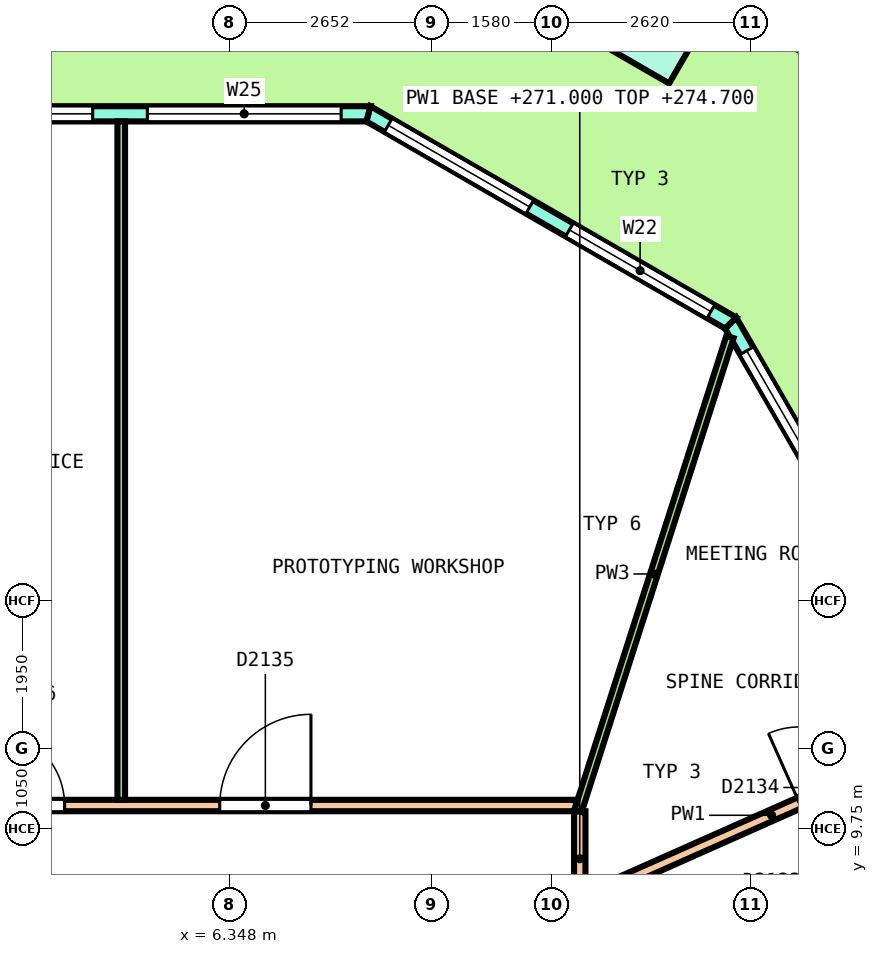
"""IFC4 building model, lengths in metres.
Left out: names, types, materials, properties, quantities, classifications, styles, units other than length and angle.
Written with IfcOpenShell. Run it as: python <this file> out.ifc"""

import sys

from ifc_helpers import new_model, si_unit, direction, frame, frame_2d, origin, origin_2d, place, context, subcontext, project, spatial, polyline, rectangle, outline, extrude, element, fill, save


model = new_model("IFC4")
c1 = context("Model", 3, precision=1e-05, world=origin(), true_north=direction((0.0, 1.0)))
c2 = subcontext(c1, "Body", "Model", "MODEL_VIEW")
j1 = project(units=[si_unit("LENGTHUNIT", "METRE"), si_unit("PLANEANGLEUNIT", "RADIAN")], contexts=[c1])
p1 = place(None, origin())
s1 = spatial("IfcSite", under=j1, at=p1, CompositionType="ELEMENT")
p2 = place(p1, origin())
s2 = spatial("IfcBuilding", under=s1, at=p2, CompositionType="ELEMENT")
p3 = place(p2, frame((0.0, 0.0, 271.0)))
s3 = spatial("IfcBuildingStorey", under=s2, at=p3, CompositionType="ELEMENT", Elevation=271.0)
p4 = place(p3, frame((11.952, 20.199, 0.0), z_axis=(0.036297136169, 0.0, 0.99934104184), x_axis=(-0.865312543657, 0.500246354177, 0.031429077673)))
e1 = element("IfcColumn", 1, at=p4, inside=s3, PredefinedType="COLUMN", context=c2, shape_type="SweptSolid", body=[
    extrude(rectangle(XDim=0.95, YDim=0.95, at=origin_2d()), origin(), (0.0, 0.0, 1.0), 3.652),
])
p5 = place(p3, frame((20.669, 3.003, 0.0), z_axis=(0.0, 0.0, 1.0), x_axis=(-0.500001185373, 0.866024719408, 0.0)))
e2 = element("IfcWall", 2, at=p5, inside=s3, PredefinedType="SOLIDWALL", context=c2, shape_type="SweptSolid", body=[
    extrude(outline(polyline([(-0.027, -0.1), (1.008, -0.1), (2.043, -0.1), (3.077, -0.1), (4.112, -0.1), (5.147, -0.1), (6.182, -0.1), (7.216, -0.1), (8.251, -0.1), (9.286, -0.1), (10.321, -0.1), (11.355, -0.1), (12.39, -0.1), (13.425, -0.1), (14.459, -0.1), (15.494, -0.1), (15.44, 0.1), (14.413, 0.1), (13.385, 0.1), (12.358, 0.1), (11.33, 0.1), (10.302, 0.1), (9.275, 0.1), (8.247, 0.1), (7.22, 0.1), (6.192, 0.1), (5.165, 0.1), (4.137, 0.1), (3.11, 0.1), (2.082, 0.1), (1.054, 0.1), (0.027, 0.1), (-0.027, -0.1)])), origin(), (0.0, 0.0, 1.0), 3.7),
])
p6 = place(p5, frame((0.422, 0.0, 0.1)))
e3 = element("IfcOpeningElement", 3, at=p6, cuts=e2, PredefinedType="OPENING", context=c2, shape_type="SweptSolid", body=[
    extrude(rectangle(XDim=2.25, YDim=2.75, at=frame_2d((1.125, 1.375))), frame((0.0, 0.11, 0.0), z_axis=(0.0, -1.0, 0.0), x_axis=(1.0, 0.0, 0.0)), (0.0, 0.0, 1.0), 0.22),
])
p7 = place(p5, frame((3.515, 0.0, 0.1)))
e4 = element("IfcOpeningElement", 4, at=p7, cuts=e2, PredefinedType="OPENING", context=c2, shape_type="SweptSolid", body=[
    extrude(rectangle(XDim=2.25, YDim=2.75, at=frame_2d((1.125, 1.375))), frame((0.0, 0.11, 0.0), z_axis=(0.0, -1.0, 0.0), x_axis=(1.0, 0.0, 0.0)), (0.0, 0.0, 1.0), 0.22),
])
p8 = place(p5, frame((6.834, 0.0, 0.0)))
e5 = element("IfcOpeningElement", 5, at=p8, cuts=e2, PredefinedType="OPENING", context=c2, shape_type="SweptSolid", body=[
    extrude(rectangle(XDim=1.8, YDim=2.4, at=frame_2d((0.9, 1.2))), frame((0.0, 0.11, 0.0), z_axis=(0.0, -1.0, 0.0), x_axis=(1.0, 0.0, 0.0)), (0.0, 0.0, 1.0), 0.22),
])
p9 = place(p5, frame((6.834, 0.0, 2.55)))
e6 = element("IfcOpeningElement", 6, at=p9, cuts=e2, PredefinedType="OPENING", context=c2, shape_type="SweptSolid", body=[
    extrude(rectangle(XDim=1.8, YDim=0.3, at=frame_2d((0.9, 0.15))), frame((0.0, 0.11, 0.0), z_axis=(0.0, -1.0, 0.0), x_axis=(1.0, 0.0, 0.0)), (0.0, 0.0, 1.0), 0.22),
])
p10 = place(p5, frame((9.702, 0.0, 0.1)))
e7 = element("IfcOpeningElement", 7, at=p10, cuts=e2, PredefinedType="OPENING", context=c2, shape_type="SweptSolid", body=[
    extrude(rectangle(XDim=2.25, YDim=2.75, at=frame_2d((1.125, 1.375))), frame((0.0, 0.11, 0.0), z_axis=(0.0, -1.0, 0.0), x_axis=(1.0, 0.0, 0.0)), (0.0, 0.0, 1.0), 0.22),
])
p11 = place(p5, frame((12.796, 0.0, 0.1)))
e8 = element("IfcOpeningElement", 8, at=p11, cuts=e2, PredefinedType="OPENING", context=c2, shape_type="SweptSolid", body=[
    extrude(rectangle(XDim=2.25, YDim=2.75, at=frame_2d((1.125, 1.375))), frame((0.0, 0.11, 0.0), z_axis=(0.0, -1.0, 0.0), x_axis=(1.0, 0.0, 0.0)), (0.0, 0.0, 1.0), 0.22),
])
p12 = place(p3, frame((12.935, 16.398, 0.0), z_axis=(0.0, 0.0, 1.0), x_axis=(-0.866026017613, 0.499998936816, 0.0)))
e9 = element("IfcWall", 9, at=p12, inside=s3, PredefinedType="SOLIDWALL", context=c2, shape_type="SweptSolid", body=[
    extrude(outline(polyline([(-0.027, -0.1), (1.084, -0.1), (2.196, -0.1), (3.307, -0.1), (4.419, -0.1), (5.53, -0.1), (5.477, 0.1), (4.387, 0.1), (3.297, 0.1), (2.207, 0.1), (1.117, 0.1), (0.027, 0.1), (-0.027, -0.1)])), origin(), (0.0, 0.0, 1.0), 3.7),
])
p13 = place(p12, frame((0.301, 0.0, 0.1)))
e10 = element("IfcOpeningElement", 10, at=p13, cuts=e9, PredefinedType="OPENING", context=c2, shape_type="SweptSolid", body=[
    extrude(rectangle(XDim=2.15, YDim=2.75, at=frame_2d((1.075, 1.375))), frame((0.0, 0.11, 0.0), z_axis=(0.0, -1.0, 0.0), x_axis=(1.0, 0.0, 0.0)), (0.0, 0.0, 1.0), 0.22),
])
p14 = place(p12, frame((3.052, 0.0, 0.1)))
e11 = element("IfcOpeningElement", 11, at=p14, cuts=e9, PredefinedType="OPENING", context=c2, shape_type="SweptSolid", body=[
    extrude(rectangle(XDim=2.15, YDim=2.75, at=frame_2d((1.075, 1.375))), frame((0.0, 0.11, 0.0), z_axis=(0.0, -1.0, 0.0), x_axis=(1.0, 0.0, 0.0)), (0.0, 0.0, 1.0), 0.22),
])
p15 = place(p3, frame((8.169, 19.15, 0.0), z_axis=(0.0, 0.0, 1.0), x_axis=(-1.0, 0.0, 0.0)))
e12 = element("IfcWall", 12, at=p15, inside=s3, PredefinedType="SOLIDWALL", context=c2, shape_type="SweptSolid", body=[
    extrude(outline(polyline([(-0.027, -0.1), (0.998, -0.1), (2.022, -0.1), (3.047, -0.1), (4.071, -0.1), (5.096, -0.1), (6.12, -0.1), (7.145, -0.1), (8.169, -0.1), (9.194, -0.1), (10.218, -0.1), (11.243, -0.1), (12.267, -0.1), (13.292, -0.1), (14.316, -0.1), (15.341, -0.1), (16.365, -0.1), (16.312, 0.1), (15.294, 0.1), (14.276, 0.1), (13.258, 0.1), (12.24, 0.1), (11.223, 0.1), (10.205, 0.1), (9.187, 0.1), (8.169, 0.1), (7.151, 0.1), (6.134, 0.1), (5.116, 0.1), (4.098, 0.1), (3.08, 0.1), (2.062, 0.1), (1.045, 0.1), (0.027, 0.1), (-0.027, -0.1)])), origin(), (0.0, 0.0, 1.0), 3.7),
])
p16 = place(p15, frame((0.359, 0.0, 0.1)))
e13 = element("IfcOpeningElement", 13, at=p16, cuts=e12, PredefinedType="OPENING", context=c2, shape_type="SweptSolid", body=[
    extrude(rectangle(XDim=2.55, YDim=2.75, at=frame_2d((1.275, 1.375))), frame((0.0, 0.11, 0.0), z_axis=(0.0, -1.0, 0.0), x_axis=(1.0, 0.0, 0.0)), (0.0, 0.0, 1.0), 0.22),
])
p17 = place(p15, frame((3.626, 0.0, 0.1)))
e14 = element("IfcOpeningElement", 14, at=p17, cuts=e12, PredefinedType="OPENING", context=c2, shape_type="SweptSolid", body=[
    extrude(rectangle(XDim=2.55, YDim=2.75, at=frame_2d((1.275, 1.375))), frame((0.0, 0.11, 0.0), z_axis=(0.0, -1.0, 0.0), x_axis=(1.0, 0.0, 0.0)), (0.0, 0.0, 1.0), 0.22),
])
p18 = place(p15, frame((7.269, 0.0, 0.0)))
e15 = element("IfcOpeningElement", 15, at=p18, cuts=e12, PredefinedType="OPENING", context=c2, shape_type="SweptSolid", body=[
    extrude(rectangle(XDim=1.8, YDim=2.4, at=frame_2d((0.9, 1.2))), frame((0.0, 0.11, 0.0), z_axis=(0.0, -1.0, 0.0), x_axis=(1.0, 0.0, 0.0)), (0.0, 0.0, 1.0), 0.22),
])
p19 = place(p15, frame((7.269, 0.0, 2.55)))
e16 = element("IfcOpeningElement", 16, at=p19, cuts=e12, PredefinedType="OPENING", context=c2, shape_type="SweptSolid", body=[
    extrude(rectangle(XDim=1.8, YDim=0.3, at=frame_2d((0.9, 0.15))), frame((0.0, 0.11, 0.0), z_axis=(0.0, -1.0, 0.0), x_axis=(1.0, 0.0, 0.0)), (0.0, 0.0, 1.0), 0.22),
])
p20 = place(p15, frame((10.162, 0.0, 0.1)))
e17 = element("IfcOpeningElement", 17, at=p20, cuts=e12, PredefinedType="OPENING", context=c2, shape_type="SweptSolid", body=[
    extrude(rectangle(XDim=2.55, YDim=2.75, at=frame_2d((1.275, 1.375))), frame((0.0, 0.11, 0.0), z_axis=(0.0, -1.0, 0.0), x_axis=(1.0, 0.0, 0.0)), (0.0, 0.0, 1.0), 0.22),
])
p21 = place(p15, frame((13.429, 0.0, 0.1)))
e18 = element("IfcOpeningElement", 18, at=p21, cuts=e12, PredefinedType="OPENING", context=c2, shape_type="SweptSolid", body=[
    extrude(rectangle(XDim=2.55, YDim=2.75, at=frame_2d((1.275, 1.375))), frame((0.0, 0.11, 0.0), z_axis=(0.0, -1.0, 0.0), x_axis=(1.0, 0.0, 0.0)), (0.0, 0.0, 1.0), 0.22),
])
p22 = place(p3, frame((11.019, 8.831, 0.0), z_axis=(0.0, 0.0, 1.0), x_axis=(0.913796559749, 0.406172189338, 0.0)))
e19 = element("IfcWall", 19, at=p22, inside=s3, PredefinedType="PARTITIONING", context=c2, shape_type="SweptSolid", body=[
    extrude(rectangle(XDim=5.374, YDim=0.15, at=frame_2d((2.687, 0.0))), origin(), (0.0, 0.0, 1.0), 2.9),
])
p23 = place(p22, frame((3.086, 0.0, 0.0)))
e20 = element("IfcOpeningElement", 20, at=p23, cuts=e19, PredefinedType="OPENING", context=c2, shape_type="SweptSolid", body=[
    extrude(rectangle(XDim=1.0, YDim=2.1, at=frame_2d((0.5, 1.05))), frame((0.0, 0.085, 0.0), z_axis=(0.0, -1.0, 0.0), x_axis=(1.0, 0.0, 0.0)), (0.0, 0.0, 1.0), 0.17),
])
p24 = place(p3, frame((10.95, 8.725, 0.0), z_axis=(0.0, 0.0, 1.0), x_axis=(0.0, 1.0, 0.0)))
e21 = element("IfcWall", 21, at=p24, inside=s3, PredefinedType="PARTITIONING", context=c2, shape_type="SweptSolid", body=[
    extrude(rectangle(XDim=1.25, YDim=0.15, at=frame_2d((0.625, 0.0))), origin(), (0.0, 0.0, 1.0), 3.7),
])
p25 = place(p3, frame((-10.875, 10.05, 0.0), z_axis=(0.0, 0.0, 1.0), x_axis=(1.0, 0.0, 0.0)))
e22 = element("IfcWall", 22, at=p25, inside=s3, PredefinedType="PARTITIONING", context=c2, shape_type="SweptSolid", body=[
    extrude(rectangle(XDim=21.775, YDim=0.15, at=frame_2d((10.887, 0.0))), origin(), (0.0, 0.0, 1.0), 2.9),
])
p26 = place(p25, frame((17.089, 0.0, 0.0)))
e23 = element("IfcOpeningElement", 23, at=p26, cuts=e22, PredefinedType="OPENING", context=c2, shape_type="SweptSolid", body=[
    extrude(rectangle(XDim=1.2, YDim=2.1, at=frame_2d((0.6, 1.05))), frame((0.0, 0.085, 0.0), z_axis=(0.0, -1.0, 0.0), x_axis=(1.0, 0.0, 0.0)), (0.0, 0.0, 1.0), 0.17),
])
p27 = place(p25, frame((14.048, 0.0, 0.0)))
e24 = element("IfcOpeningElement", 24, at=p27, cuts=e22, PredefinedType="OPENING", context=c2, shape_type="SweptSolid", body=[
    extrude(rectangle(XDim=1.0, YDim=2.1, at=frame_2d((0.5, 1.05))), frame((0.0, 0.085, 0.0), z_axis=(0.0, -1.0, 0.0), x_axis=(1.0, 0.0, 0.0)), (0.0, 0.0, 1.0), 0.17),
])
p28 = place(p25, frame((7.521, 0.0, 0.0)))
e25 = element("IfcOpeningElement", 25, at=p28, cuts=e22, PredefinedType="OPENING", context=c2, shape_type="SweptSolid", body=[
    extrude(rectangle(XDim=1.0, YDim=2.1, at=frame_2d((0.5, 1.05))), frame((0.0, 0.085, 0.0), z_axis=(0.0, -1.0, 0.0), x_axis=(1.0, 0.0, 0.0)), (0.0, 0.0, 1.0), 0.17),
])
p29 = place(p25, frame((4.213, 0.0, 0.0)))
e26 = element("IfcOpeningElement", 26, at=p29, cuts=e22, PredefinedType="OPENING", context=c2, shape_type="SweptSolid", body=[
    extrude(rectangle(XDim=1.0, YDim=2.1, at=frame_2d((0.5, 1.05))), frame((0.0, 0.085, 0.0), z_axis=(0.0, -1.0, 0.0), x_axis=(1.0, 0.0, 0.0)), (0.0, 0.0, 1.0), 0.17),
])
p30 = place(p25, frame((1.082, 0.0, 0.0)))
e27 = element("IfcOpeningElement", 27, at=p30, cuts=e22, PredefinedType="OPENING", context=c2, shape_type="SweptSolid", body=[
    extrude(rectangle(XDim=1.0, YDim=2.1, at=frame_2d((0.5, 1.05))), frame((0.0, 0.085, 0.0), z_axis=(0.0, -1.0, 0.0), x_axis=(1.0, 0.0, 0.0)), (0.0, 0.0, 1.0), 0.17),
])
p31 = place(p3, frame((10.927, 9.979, 0.0), z_axis=(0.0, 0.0, 1.0), x_axis=(0.305268095112, 0.952266449113, 0.0)))
e28 = element("IfcWall", 28, at=p31, inside=s3, PredefinedType="PARTITIONING", context=c2, shape_type="SweptSolid", body=[
    extrude(rectangle(XDim=6.548, YDim=0.1, at=frame_2d((3.274, 0.0))), origin(), (0.0, 0.0, 1.0), 2.9),
])
p32 = place(p3, frame((4.917, 10.125, 0.0), z_axis=(0.0, 0.0, 1.0), x_axis=(0.0, 1.0, 0.0)))
e29 = element("IfcWall", 29, at=p32, inside=s3, PredefinedType="PARTITIONING", context=c2, shape_type="SweptSolid", body=[
    extrude(rectangle(XDim=8.925, YDim=0.1, at=frame_2d((4.462, 0.0))), origin(), (0.0, 0.0, 1.0), 2.9),
])
p33 = place(p11, origin())
e30 = element("IfcWindow", 30, at=p33, inside=s3, PartitioningType="SINGLE_PANEL", PredefinedType="WINDOW", context=c2, shape_type="SweptSolid", body=[
    extrude(rectangle(XDim=2.25, YDim=2.75, at=frame_2d((1.125, 1.375))), frame((0.0, 0.03, 0.0), z_axis=(0.0, -1.0, 0.0), x_axis=(1.0, 0.0, 0.0)), (0.0, 0.0, 1.0), 0.06),
])
fill(e8, e30)
p34 = place(p13, origin())
e31 = element("IfcWindow", 31, at=p34, inside=s3, PartitioningType="SINGLE_PANEL", PredefinedType="WINDOW", context=c2, shape_type="SweptSolid", body=[
    extrude(rectangle(XDim=2.15, YDim=2.75, at=frame_2d((1.075, 1.375))), frame((0.0, 0.03, 0.0), z_axis=(0.0, -1.0, 0.0), x_axis=(1.0, 0.0, 0.0)), (0.0, 0.0, 1.0), 0.06),
])
fill(e10, e31)
p35 = place(p14, origin())
e32 = element("IfcWindow", 32, at=p35, inside=s3, PartitioningType="SINGLE_PANEL", PredefinedType="WINDOW", context=c2, shape_type="SweptSolid", body=[
    extrude(rectangle(XDim=2.15, YDim=2.75, at=frame_2d((1.075, 1.375))), frame((0.0, 0.03, 0.0), z_axis=(0.0, -1.0, 0.0), x_axis=(1.0, 0.0, 0.0)), (0.0, 0.0, 1.0), 0.06),
])
fill(e11, e32)
p36 = place(p16, origin())
e33 = element("IfcWindow", 33, at=p36, inside=s3, PartitioningType="SINGLE_PANEL", PredefinedType="WINDOW", context=c2, shape_type="SweptSolid", body=[
    extrude(rectangle(XDim=2.55, YDim=2.75, at=frame_2d((1.275, 1.375))), frame((0.0, 0.03, 0.0), z_axis=(0.0, -1.0, 0.0), x_axis=(1.0, 0.0, 0.0)), (0.0, 0.0, 1.0), 0.06),
])
fill(e13, e33)
p37 = place(p17, origin())
e34 = element("IfcWindow", 34, at=p37, inside=s3, PartitioningType="SINGLE_PANEL", PredefinedType="WINDOW", context=c2, shape_type="SweptSolid", body=[
    extrude(rectangle(XDim=2.55, YDim=2.75, at=frame_2d((1.275, 1.375))), frame((0.0, 0.03, 0.0), z_axis=(0.0, -1.0, 0.0), x_axis=(1.0, 0.0, 0.0)), (0.0, 0.0, 1.0), 0.06),
])
fill(e14, e34)
p38 = place(p26, origin())
e35 = element("IfcDoor", 35, at=p38, inside=s3, OperationType="DOUBLE_DOOR_SINGLE_SWING", PredefinedType="DOOR", context=c2, shape_type="SweptSolid", body=[
    extrude(rectangle(XDim=1.2, YDim=2.1, at=frame_2d((0.6, 1.05))), frame((0.0, 0.025, 0.0), z_axis=(0.0, -1.0, 0.0), x_axis=(1.0, 0.0, 0.0)), (0.0, 0.0, 1.0), 0.05),
])
fill(e23, e35)
p39 = place(p27, origin())
e36 = element("IfcDoor", 36, at=p39, inside=s3, OperationType="SINGLE_SWING_LEFT", PredefinedType="DOOR", context=c2, shape_type="SweptSolid", body=[
    extrude(rectangle(XDim=1.0, YDim=2.1, at=frame_2d((0.5, 1.05))), frame((0.0, 0.025, 0.0), z_axis=(0.0, -1.0, 0.0), x_axis=(1.0, 0.0, 0.0)), (0.0, 0.0, 1.0), 0.05),
])
fill(e24, e36)
save(model, sys.argv[1])
